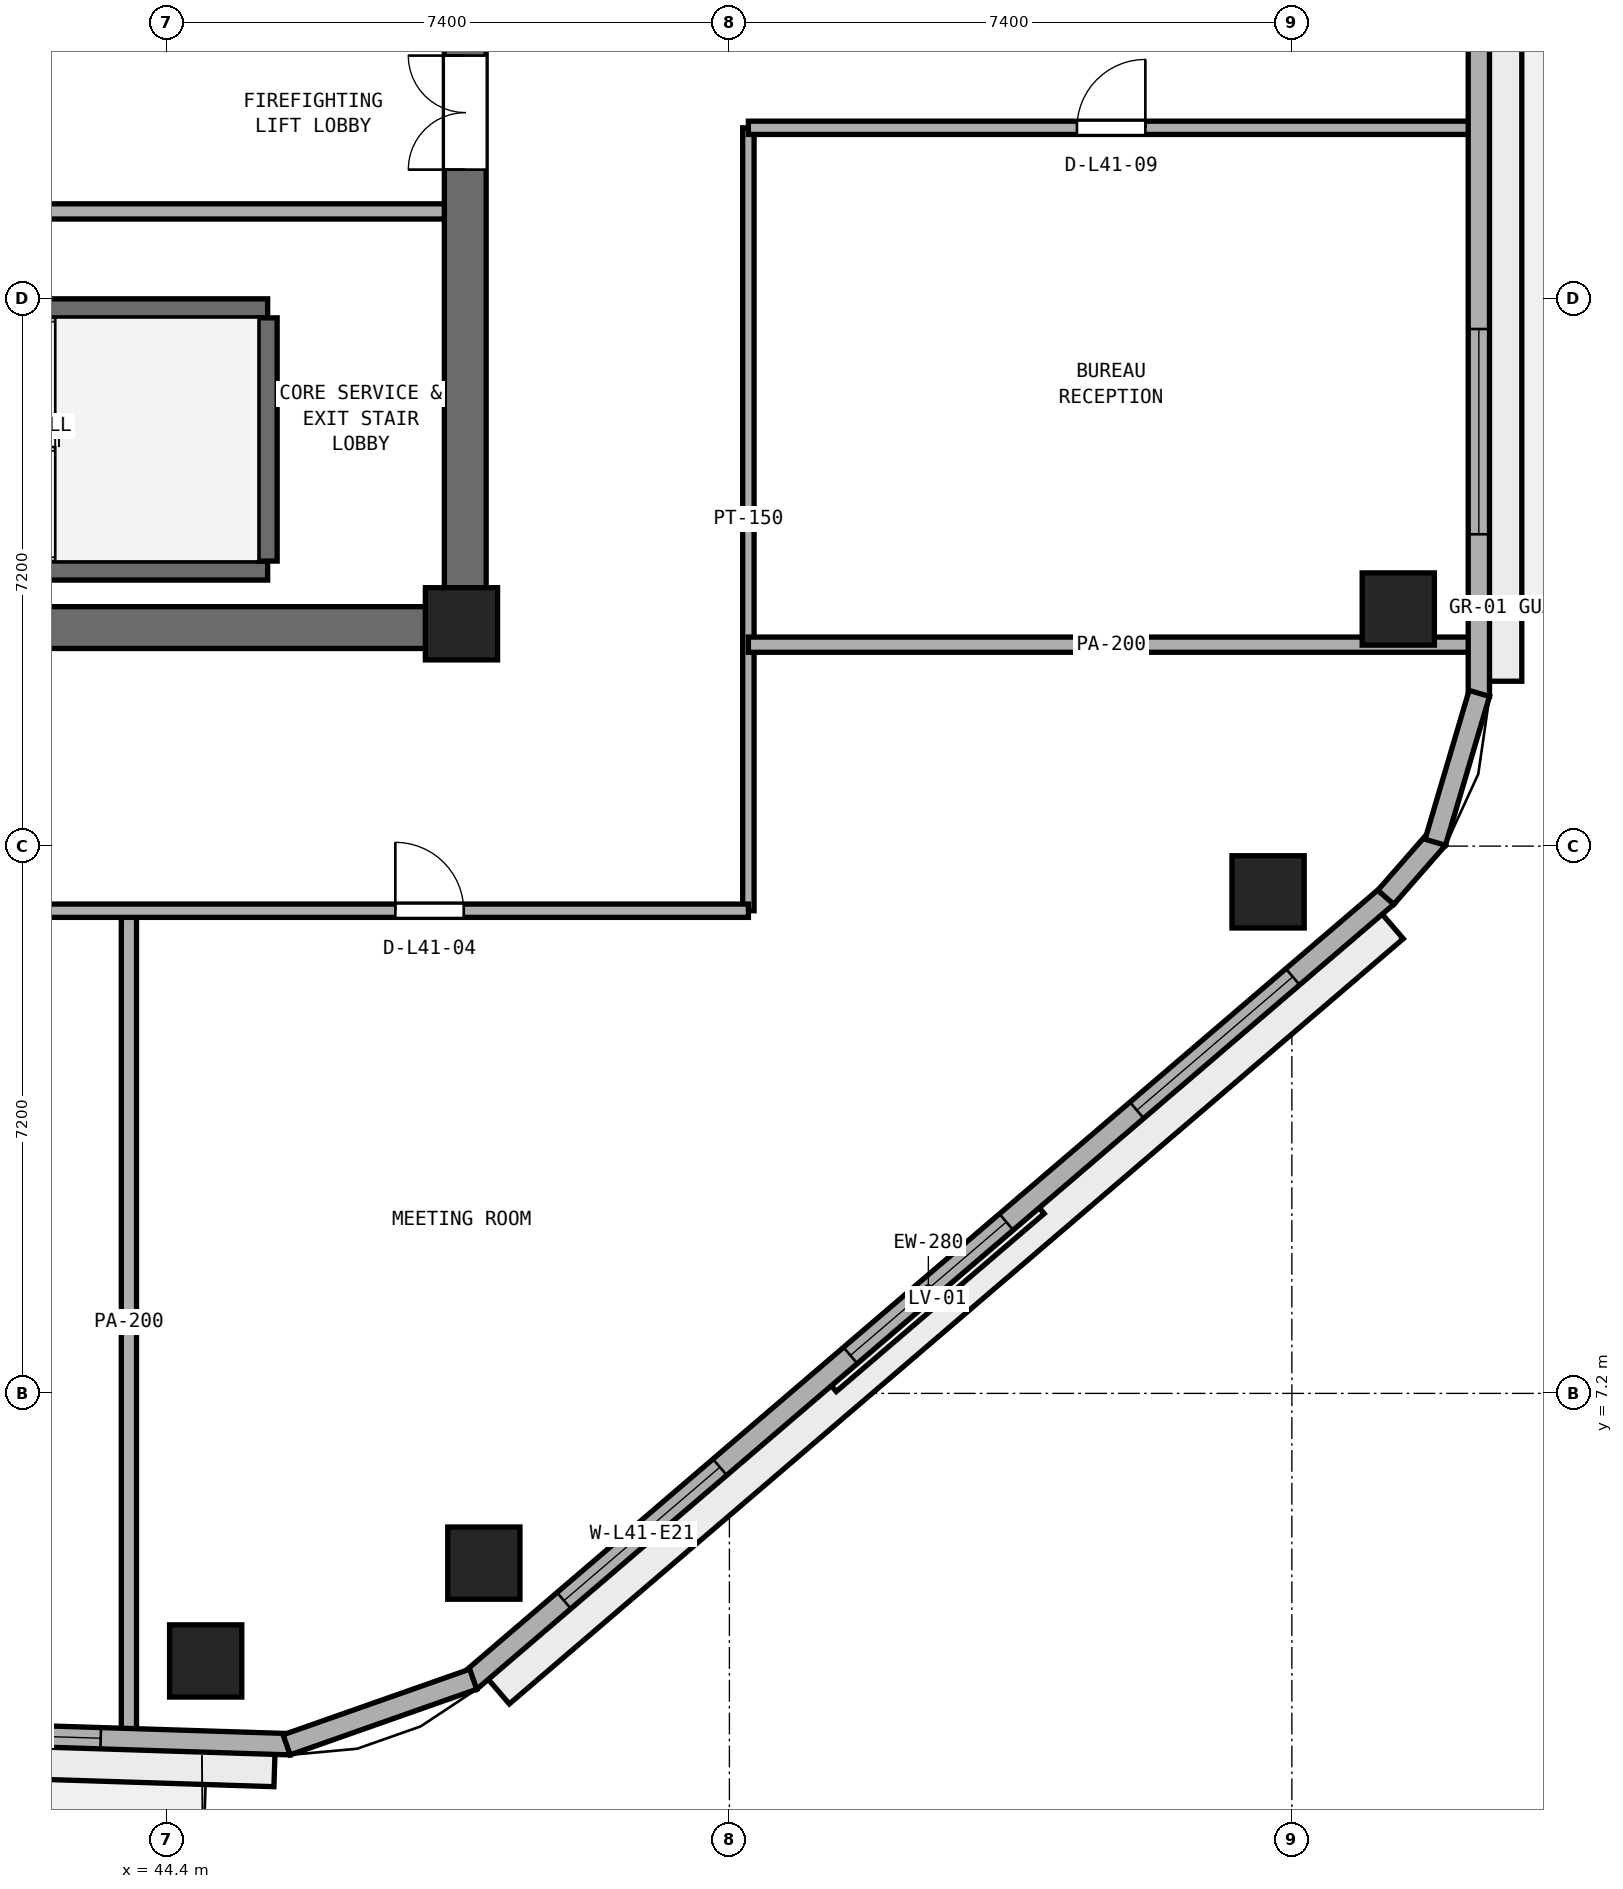
"""IFC4 building model, lengths in metres.
Left out: names, types, materials, properties, quantities, classifications, styles, units other than length and angle.
Written with IfcOpenShell. Run it as: python <this file> out.ifc"""

import sys

from ifc_helpers import new_model, si_unit, direction, frame, frame_2d, origin, origin_2d, place, context, subcontext, project, spatial, rectangle, extrude, element, fill, save


model = new_model("IFC4")
c1 = context("Model", 3, precision=1e-05, world=origin(), true_north=direction((0.0, 1.0)))
c2 = subcontext(c1, "Body", "Model", "MODEL_VIEW")
j1 = project(units=[si_unit("LENGTHUNIT", "METRE"), si_unit("PLANEANGLEUNIT", "RADIAN")], contexts=[c1])
p1 = place(None, origin())
s1 = spatial("IfcSite", under=j1, at=p1, CompositionType="ELEMENT")
p2 = place(p1, origin())
s2 = spatial("IfcBuilding", under=s1, at=p2, CompositionType="ELEMENT")
p3 = place(p2, frame((0.0, 0.0, 163.0)))
s3 = spatial("IfcBuildingStorey", under=s2, at=p3, CompositionType="ELEMENT", Elevation=163.0)
p4 = place(p3, frame((25.4, 17.275, 0.0), z_axis=(0.0, 0.0, 1.0), x_axis=(1.0, 0.0, 0.0)))
e1 = element("IfcWall", 1, at=p4, inside=s3, PredefinedType="SHEAR", context=c2, shape_type="SweptSolid", body=[
    extrude(rectangle(XDim=23.2, YDim=0.55, at=frame_2d((11.6, 0.0))), origin(), (0.0, 0.0, 1.0), 3.54),
])
p5 = place(p3, frame((48.325, 17.55, 0.0), z_axis=(0.0, 0.0, 1.0), x_axis=(0.0, 1.0, 0.0)))
e2 = element("IfcWall", 2, at=p5, inside=s3, PredefinedType="SHEAR", context=c2, shape_type="SweptSolid", body=[
    extrude(rectangle(XDim=15.3, YDim=0.55, at=frame_2d((7.65, 0.0))), origin(), (0.0, 0.0, 1.0), 3.54),
])
p6 = place(p5, frame((5.75, 0.0, 0.0)))
e3 = element("IfcOpeningElement", 3, at=p6, cuts=e2, PredefinedType="OPENING", context=c2, shape_type="SweptSolid", body=[
    extrude(rectangle(XDim=1.5, YDim=2.15, at=frame_2d((0.75, 1.075))), frame((0.0, 0.285, 0.0), z_axis=(0.0, -1.0, 0.0), x_axis=(1.0, 0.0, 0.0)), (0.0, 0.0, 1.0), 0.57),
])
p7 = place(p3, frame((48.275, 17.325, 0.0), z_axis=(0.0, 0.0, 1.0), x_axis=(1.0, 0.0, 0.0)))
e4 = element("IfcColumn", 4, at=p7, inside=s3, PredefinedType="PILASTER", context=c2, shape_type="SweptSolid", body=[
    extrude(rectangle(XDim=0.95, YDim=0.95, at=origin_2d()), origin(), (0.0, 0.0, 1.0), 3.8),
])
for number, where, z_axis, x_axis in (
    (5, (44.91, 3.68, 0.0), (0.0, 0.0, 1.0), (1.0, 0.0, 0.0)),
    (6, (48.57, 4.967, 0.0), (0.0, 0.0, 1.0), (1.0, 0.0, 0.0)),
    (7, (58.887, 13.798, 0.0), (0.0, 0.0, 1.0), (1.0, 0.0, 0.0)),
    (8, (60.6, 17.519, 0.0), (0.0, 0.0, 1.0), (1.0, 0.0, 0.0)),
):
    element("IfcColumn", number, at=place(p3, frame(where, z_axis=z_axis, x_axis=x_axis)), inside=s3, PredefinedType="COLUMN", context=c2, shape_type="SweptSolid", body=[
        extrude(rectangle(XDim=0.95, YDim=0.95, at=origin_2d()), origin(), (0.0, 0.0, 1.0), 3.8),
    ])
for number, where, z_axis, x_axis in (
    (9, (38.425, 18.025, 0.0), (0.0, 0.0, 1.0), (1.0, 0.0, 0.0)),
    (10, (38.425, 21.475, 0.0), (0.0, 0.0, 1.0), (1.0, 0.0, 0.0)),
):
    element("IfcWall", number, at=place(p3, frame(where, z_axis=z_axis, x_axis=x_axis)), inside=s3, PredefinedType="SHEAR", context=c2, shape_type="SweptSolid", body=[
        extrude(rectangle(XDim=7.3, YDim=0.25, at=frame_2d((3.65, 0.0))), origin(), (0.0, 0.0, 1.0), 3.54),
    ])
p8 = place(p3, frame((45.725, 18.15, 0.0), z_axis=(0.0, 0.0, 1.0), x_axis=(0.0, 1.0, 0.0)))
e11 = element("IfcWall", 11, at=p8, inside=s3, PredefinedType="SHEAR", context=c2, shape_type="SweptSolid", body=[
    extrude(rectangle(XDim=3.2, YDim=0.25, at=frame_2d((1.6, 0.0))), origin(), (0.0, 0.0, 1.0), 3.54),
])
p9 = place(p3, frame((42.0, 22.75, 0.0), z_axis=(0.0, 0.0, 1.0), x_axis=(1.0, 0.0, 0.0)))
e12 = element("IfcWall", 12, at=p9, inside=s3, PredefinedType="SOLIDWALL", context=c2, shape_type="SweptSolid", body=[
    extrude(rectangle(XDim=6.05, YDim=0.2, at=frame_2d((3.025, 0.0))), origin(), (0.0, 0.0, 1.0), 3.54),
])
p10 = place(p3, frame((52.05, 13.55, 0.0), z_axis=(0.0, 0.0, 1.0), x_axis=(0.0, 1.0, 0.0)))
e13 = element("IfcWall", 13, at=p10, inside=s3, PredefinedType="PARTITIONING", context=c2, shape_type="SweptSolid", body=[
    extrude(rectangle(XDim=10.3, YDim=0.15, at=frame_2d((5.15, 0.0))), origin(), (0.0, 0.0, 1.0), 3.54),
])
p11 = place(p3, frame((43.9, 2.717, 0.0), z_axis=(0.0, 0.0, 1.0), x_axis=(0.0, 1.0, 0.0)))
e14 = element("IfcWall", 14, at=p11, inside=s3, PredefinedType="PARTITIONING", context=c2, shape_type="SweptSolid", body=[
    extrude(rectangle(XDim=10.833, YDim=0.2, at=frame_2d((5.417, 0.0))), origin(), (0.0, 0.0, 1.0), 3.54),
])
p12 = place(p3, frame((21.95, 13.55, 0.0), z_axis=(0.0, 0.0, 1.0), x_axis=(1.0, 0.0, 0.0)))
e15 = element("IfcWall", 15, at=p12, inside=s3, PredefinedType="PARTITIONING", context=c2, shape_type="SweptSolid", body=[
    extrude(rectangle(XDim=30.1, YDim=0.175, at=frame_2d((15.05, 0.0))), origin(), (0.0, 0.0, 1.0), 3.54),
])
p13 = place(p12, frame((10.645, 0.0, 0.0)))
e16 = element("IfcOpeningElement", 16, at=p13, cuts=e15, PredefinedType="OPENING", context=c2, shape_type="SweptSolid", body=[
    extrude(rectangle(XDim=0.9, YDim=2.1, at=frame_2d((0.45, 1.05))), frame((0.0, 0.097, 0.0), z_axis=(0.0, -1.0, 0.0), x_axis=(1.0, 0.0, 0.0)), (0.0, 0.0, 1.0), 0.195),
])
p14 = place(p12, frame((25.455, 0.0, 0.0)))
e17 = element("IfcOpeningElement", 17, at=p14, cuts=e15, PredefinedType="OPENING", context=c2, shape_type="SweptSolid", body=[
    extrude(rectangle(XDim=0.9, YDim=2.1, at=frame_2d((0.45, 1.05))), frame((0.0, 0.097, 0.0), z_axis=(0.0, -1.0, 0.0), x_axis=(1.0, 0.0, 0.0)), (0.0, 0.0, 1.0), 0.195),
])
p15 = place(p3, frame((52.05, 17.05, 0.0), z_axis=(0.0, 0.0, 1.0), x_axis=(1.0, 0.0, 0.0)))
e18 = element("IfcWall", 18, at=p15, inside=s3, PredefinedType="PARTITIONING", context=c2, shape_type="SweptSolid", body=[
    extrude(rectangle(XDim=9.545, YDim=0.2, at=frame_2d((4.772, 0.0))), origin(), (0.0, 0.0, 1.0), 3.54),
])
p16 = place(p3, frame((52.05, 23.85, 0.0), z_axis=(0.0, 0.0, 1.0), x_axis=(1.0, 0.0, 0.0)))
e19 = element("IfcWall", 19, at=p16, inside=s3, PredefinedType="PARTITIONING", context=c2, shape_type="SweptSolid", body=[
    extrude(rectangle(XDim=9.545, YDim=0.175, at=frame_2d((4.772, 0.0))), origin(), (0.0, 0.0, 1.0), 3.54),
])
p17 = place(p16, frame((4.323, 0.0, 0.0)))
e20 = element("IfcOpeningElement", 20, at=p17, cuts=e19, PredefinedType="OPENING", context=c2, shape_type="SweptSolid", body=[
    extrude(rectangle(XDim=0.9, YDim=2.1, at=frame_2d((0.45, 1.05))), frame((0.0, 0.097, 0.0), z_axis=(0.0, -1.0, 0.0), x_axis=(1.0, 0.0, 0.0)), (0.0, 0.0, 1.0), 0.195),
])
p18 = place(p3, frame((29.625, 3.104, 0.0), z_axis=(0.0, 0.0, 1.0), x_axis=(0.99949718661, -0.031707632487, 0.0)))
e21 = element("IfcWall", 21, at=p18, inside=s3, PredefinedType="STANDARD", context=c2, shape_type="SweptSolid", body=[
    extrude(rectangle(XDim=16.408, YDim=0.28, at=frame_2d((8.204, 0.0))), origin(), (0.0, 0.0, 1.0), 3.54),
])
p19 = place(p18, frame((7.654, 0.0, 0.0)))
e22 = element("IfcOpeningElement", 22, at=p19, cuts=e21, PredefinedType="OPENING", context=c2, shape_type="SweptSolid", body=[
    extrude(rectangle(XDim=1.1, YDim=2.2, at=frame_2d((0.55, 1.1))), frame((0.0, 0.15, 0.0), z_axis=(0.0, -1.0, 0.0), x_axis=(1.0, 0.0, 0.0)), (0.0, 0.0, 1.0), 0.3),
])
p20 = place(p18, frame((1.718, 0.0, 0.9)))
e23 = element("IfcOpeningElement", 23, at=p20, cuts=e21, PredefinedType="OPENING", context=c2, shape_type="SweptSolid", body=[
    extrude(rectangle(XDim=2.7, YDim=1.75, at=frame_2d((1.35, 0.875))), frame((0.0, 0.15, 0.0), z_axis=(0.0, -1.0, 0.0), x_axis=(1.0, 0.0, 0.0)), (0.0, 0.0, 1.0), 0.3),
])
p21 = place(p18, frame((11.21, 0.0, 0.9)))
e24 = element("IfcOpeningElement", 24, at=p21, cuts=e21, PredefinedType="OPENING", context=c2, shape_type="SweptSolid", body=[
    extrude(rectangle(XDim=2.7, YDim=1.75, at=frame_2d((1.35, 0.875))), frame((0.0, 0.15, 0.0), z_axis=(0.0, -1.0, 0.0), x_axis=(1.0, 0.0, 0.0)), (0.0, 0.0, 1.0), 0.3),
])
p22 = place(p3, frame((48.385, 3.414, 0.0), z_axis=(0.0, 0.0, 1.0), x_axis=(0.759700260779, 0.650273414628, 0.0)))
e25 = element("IfcWall", 25, at=p22, inside=s3, PredefinedType="STANDARD", context=c2, shape_type="SweptSolid", body=[
    extrude(rectangle(XDim=15.881, YDim=0.28, at=frame_2d((7.94, 0.0))), origin(), (0.0, 0.0, 1.0), 3.54),
])
p23 = place(p22, frame((1.63, 0.0, 0.9)))
e26 = element("IfcOpeningElement", 26, at=p23, cuts=e25, PredefinedType="OPENING", context=c2, shape_type="SweptSolid", body=[
    extrude(rectangle(XDim=2.7, YDim=1.75, at=frame_2d((1.35, 0.875))), frame((0.0, 0.15, 0.0), z_axis=(0.0, -1.0, 0.0), x_axis=(1.0, 0.0, 0.0)), (0.0, 0.0, 1.0), 0.3),
])
p24 = place(p22, frame((6.59, 0.0, 0.9)))
e27 = element("IfcOpeningElement", 27, at=p24, cuts=e25, PredefinedType="OPENING", context=c2, shape_type="SweptSolid", body=[
    extrude(rectangle(XDim=2.7, YDim=1.75, at=frame_2d((1.35, 0.875))), frame((0.0, 0.15, 0.0), z_axis=(0.0, -1.0, 0.0), x_axis=(1.0, 0.0, 0.0)), (0.0, 0.0, 1.0), 0.3),
])
p25 = place(p22, frame((11.551, 0.0, 0.9)))
e28 = element("IfcOpeningElement", 28, at=p25, cuts=e25, PredefinedType="OPENING", context=c2, shape_type="SweptSolid", body=[
    extrude(rectangle(XDim=2.7, YDim=1.75, at=frame_2d((1.35, 0.875))), frame((0.0, 0.15, 0.0), z_axis=(0.0, -1.0, 0.0), x_axis=(1.0, 0.0, 0.0)), (0.0, 0.0, 1.0), 0.3),
])
p26 = place(p3, frame((61.66, 16.369, 0.0), z_axis=(0.0, 0.0, 1.0), x_axis=(0.0, 1.0, 0.0)))
e29 = element("IfcWall", 29, at=p26, inside=s3, PredefinedType="STANDARD", context=c2, shape_type="SweptSolid", body=[
    extrude(rectangle(XDim=18.902, YDim=0.28, at=frame_2d((9.451, 0.0))), origin(), (0.0, 0.0, 1.0), 3.54),
])
p27 = place(p26, frame((8.601, 0.0, 0.0)))
e30 = element("IfcOpeningElement", 30, at=p27, cuts=e29, PredefinedType="OPENING", context=c2, shape_type="SweptSolid", body=[
    extrude(rectangle(XDim=1.1, YDim=2.2, at=frame_2d((0.55, 1.1))), frame((0.0, 0.15, 0.0), z_axis=(0.0, -1.0, 0.0), x_axis=(1.0, 0.0, 0.0)), (0.0, 0.0, 1.0), 0.3),
])
p28 = place(p26, frame((2.134, 0.0, 0.9)))
e31 = element("IfcOpeningElement", 31, at=p28, cuts=e29, PredefinedType="OPENING", context=c2, shape_type="SweptSolid", body=[
    extrude(rectangle(XDim=2.7, YDim=1.75, at=frame_2d((1.35, 0.875))), frame((0.0, 0.15, 0.0), z_axis=(0.0, -1.0, 0.0), x_axis=(1.0, 0.0, 0.0)), (0.0, 0.0, 1.0), 0.3),
])
p29 = place(p26, frame((14.069, 0.0, 0.9)))
e32 = element("IfcOpeningElement", 32, at=p29, cuts=e29, PredefinedType="OPENING", context=c2, shape_type="SweptSolid", body=[
    extrude(rectangle(XDim=2.7, YDim=1.75, at=frame_2d((1.35, 0.875))), frame((0.0, 0.15, 0.0), z_axis=(0.0, -1.0, 0.0), x_axis=(1.0, 0.0, 0.0)), (0.0, 0.0, 1.0), 0.3),
])
p30 = place(p3, frame((45.975, 2.576, 0.0), z_axis=(0.0, 0.0, 1.0), x_axis=(0.943377643365, 0.331720698781, 0.0)))
e33 = element("IfcWall", 33, at=p30, inside=s3, PredefinedType="STANDARD", context=c2, shape_type="SweptSolid", body=[
    extrude(rectangle(XDim=2.603, YDim=0.28, at=frame_2d((1.301, 0.0))), origin(), (0.0, 0.0, 1.0), 3.54),
])
p31 = place(p3, frame((60.436, 13.727, 0.0), z_axis=(0.0, 0.0, 1.0), x_axis=(0.658571618609, 0.752518055041, 0.0)))
e34 = element("IfcWall", 34, at=p31, inside=s3, PredefinedType="STANDARD", context=c2, shape_type="SweptSolid", body=[
    extrude(rectangle(XDim=1.032, YDim=0.28, at=frame_2d((0.516, 0.0))), origin(), (0.0, 0.0, 1.0), 3.54),
])
p32 = place(p3, frame((61.086, 14.45, 0.0), z_axis=(0.0, 0.0, 1.0), x_axis=(0.283660953453, 0.958924639107, 0.0)))
e35 = element("IfcWall", 35, at=p32, inside=s3, PredefinedType="STANDARD", context=c2, shape_type="SweptSolid", body=[
    extrude(rectangle(XDim=2.042, YDim=0.28, at=frame_2d((1.021, 0.0))), origin(), (0.0, 0.0, 1.0), 3.54),
])
p33 = place(p6, origin())
e36 = element("IfcDoor", 36, at=p33, inside=s3, OperationType="DOUBLE_DOOR_SINGLE_SWING", PredefinedType="DOOR", context=c2, shape_type="SweptSolid", body=[
    extrude(rectangle(XDim=1.5, YDim=2.15, at=frame_2d((0.75, 1.075))), frame((0.0, 0.025, 0.0), z_axis=(0.0, -1.0, 0.0), x_axis=(1.0, 0.0, 0.0)), (0.0, 0.0, 1.0), 0.05),
])
fill(e3, e36)
p34 = place(p14, origin())
e37 = element("IfcDoor", 37, at=p34, inside=s3, OperationType="SINGLE_SWING_LEFT", PredefinedType="DOOR", context=c2, shape_type="SweptSolid", body=[
    extrude(rectangle(XDim=0.9, YDim=2.1, at=frame_2d((0.45, 1.05))), frame((0.0, 0.025, 0.0), z_axis=(0.0, -1.0, 0.0), x_axis=(1.0, 0.0, 0.0)), (0.0, 0.0, 1.0), 0.05),
])
fill(e17, e37)
p35 = place(p17, origin())
e38 = element("IfcDoor", 38, at=p35, inside=s3, OperationType="SINGLE_SWING_RIGHT", PredefinedType="DOOR", context=c2, shape_type="SweptSolid", body=[
    extrude(rectangle(XDim=0.9, YDim=2.1, at=frame_2d((0.45, 1.05))), frame((0.0, 0.025, 0.0), z_axis=(0.0, -1.0, 0.0), x_axis=(1.0, 0.0, 0.0)), (0.0, 0.0, 1.0), 0.05),
])
fill(e20, e38)
p36 = place(p21, origin())
e39 = element("IfcWindow", 39, at=p36, inside=s3, PartitioningType="SINGLE_PANEL", PredefinedType="WINDOW", context=c2, shape_type="SweptSolid", body=[
    extrude(rectangle(XDim=2.7, YDim=1.75, at=frame_2d((1.35, 0.875))), frame((0.0, 0.03, 0.0), z_axis=(0.0, -1.0, 0.0), x_axis=(1.0, 0.0, 0.0)), (0.0, 0.0, 1.0), 0.06),
])
fill(e24, e39)
p37 = place(p23, origin())
e40 = element("IfcWindow", 40, at=p37, inside=s3, PartitioningType="SINGLE_PANEL", PredefinedType="WINDOW", context=c2, shape_type="SweptSolid", body=[
    extrude(rectangle(XDim=2.7, YDim=1.75, at=frame_2d((1.35, 0.875))), frame((0.0, 0.03, 0.0), z_axis=(0.0, -1.0, 0.0), x_axis=(1.0, 0.0, 0.0)), (0.0, 0.0, 1.0), 0.06),
])
fill(e26, e40)
p38 = place(p24, origin())
e41 = element("IfcWindow", 41, at=p38, inside=s3, PartitioningType="SINGLE_PANEL", PredefinedType="WINDOW", context=c2, shape_type="SweptSolid", body=[
    extrude(rectangle(XDim=2.7, YDim=1.75, at=frame_2d((1.35, 0.875))), frame((0.0, 0.03, 0.0), z_axis=(0.0, -1.0, 0.0), x_axis=(1.0, 0.0, 0.0)), (0.0, 0.0, 1.0), 0.06),
])
fill(e27, e41)
p39 = place(p25, origin())
e42 = element("IfcWindow", 42, at=p39, inside=s3, PartitioningType="SINGLE_PANEL", PredefinedType="WINDOW", context=c2, shape_type="SweptSolid", body=[
    extrude(rectangle(XDim=2.7, YDim=1.75, at=frame_2d((1.35, 0.875))), frame((0.0, 0.03, 0.0), z_axis=(0.0, -1.0, 0.0), x_axis=(1.0, 0.0, 0.0)), (0.0, 0.0, 1.0), 0.06),
])
fill(e28, e42)
p40 = place(p28, origin())
e43 = element("IfcWindow", 43, at=p40, inside=s3, PartitioningType="SINGLE_PANEL", PredefinedType="WINDOW", context=c2, shape_type="SweptSolid", body=[
    extrude(rectangle(XDim=2.7, YDim=1.75, at=frame_2d((1.35, 0.875))), frame((0.0, 0.03, 0.0), z_axis=(0.0, -1.0, 0.0), x_axis=(1.0, 0.0, 0.0)), (0.0, 0.0, 1.0), 0.06),
])
fill(e31, e43)
save(model, sys.argv[1])
